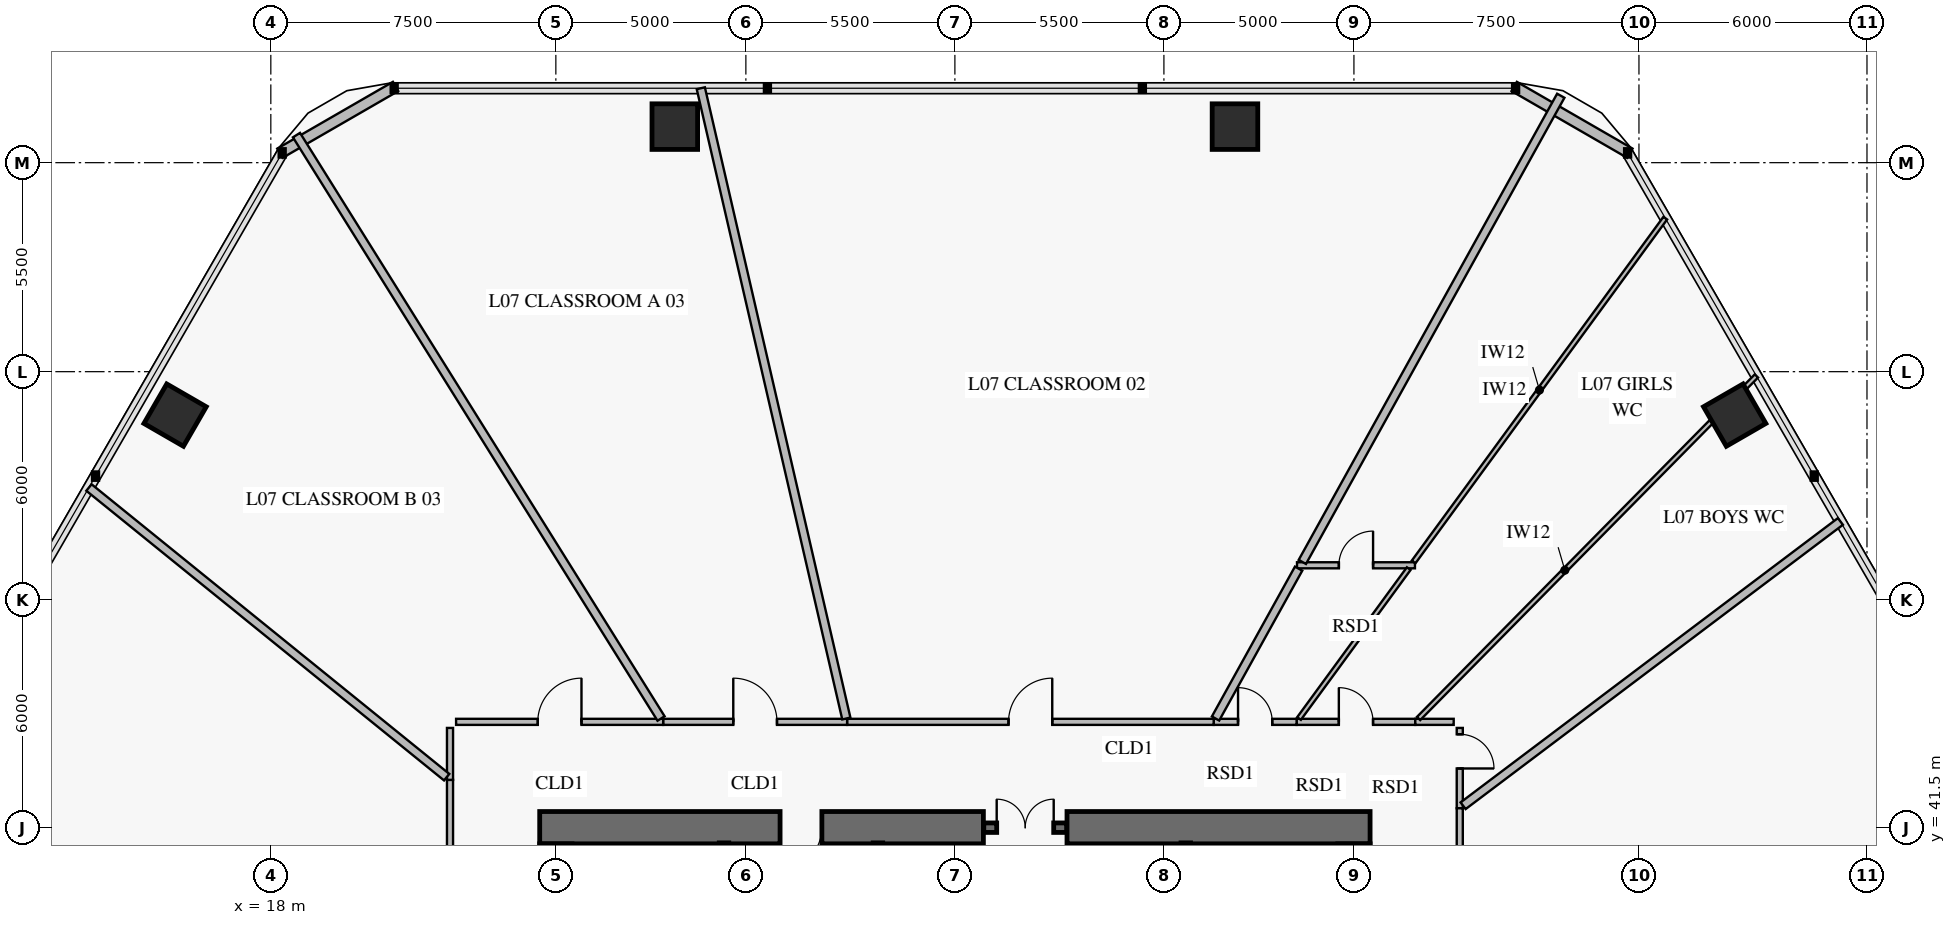
"""IFC4 building model, lengths in metres.
Left out: names, types, materials, properties, quantities, classifications, styles, units other than length and angle.
Written with IfcOpenShell. Run it as: python <this file> out.ifc"""

import sys

from ifc_helpers import new_model, si_unit, direction, frame, frame_2d, origin, origin_2d, place, context, subcontext, project, spatial, rectangle, extrude, element, fill, save


model = new_model("IFC4")
c1 = context("Model", 3, precision=1e-05, world=origin(), true_north=direction((0.0, 1.0)))
c2 = subcontext(c1, "Body", "Model", "MODEL_VIEW")
j1 = project(units=[si_unit("LENGTHUNIT", "METRE"), si_unit("PLANEANGLEUNIT", "RADIAN")], contexts=[c1])
p1 = place(None, origin())
s1 = spatial("IfcSite", under=j1, at=p1, CompositionType="ELEMENT")
p2 = place(p1, origin())
s2 = spatial("IfcBuilding", under=s1, at=p2, CompositionType="ELEMENT")
p3 = place(p2, frame((0.0, 0.0, 28.8)))
s3 = spatial("IfcBuildingStorey", under=s2, at=p3, CompositionType="ELEMENT", Elevation=28.8)
p4 = place(p3, frame((46.925, 41.5, 0.0), z_axis=(0.0, 0.0, 1.0), x_axis=(-1.0, 0.0, 0.0)))
e1 = element("IfcWall", 1, at=p4, inside=s3, PredefinedType="SHEAR", context=c2, shape_type="SweptSolid", body=[
    extrude(rectangle(XDim=7.975, YDim=0.85, at=frame_2d((3.988, 0.0))), origin(), (0.0, 0.0, 1.0), 4.2),
])
p5 = place(p3, frame((36.75, 41.5, 0.0), z_axis=(0.0, 0.0, 1.0), x_axis=(-1.0, 0.0, 0.0)))
e2 = element("IfcWall", 2, at=p5, inside=s3, PredefinedType="SHEAR", context=c2, shape_type="SweptSolid", body=[
    extrude(rectangle(XDim=11.675, YDim=0.85, at=frame_2d((5.837, 0.0))), origin(), (0.0, 0.0, 1.0), 4.2),
])
p6 = place(p5, frame((4.25, 0.0, 0.0)))
e3 = element("IfcOpeningElement", 3, at=p6, cuts=e2, PredefinedType="OPENING", context=c2, shape_type="SweptSolid", body=[
    extrude(rectangle(XDim=1.1, YDim=2.15, at=frame_2d((0.55, 1.075))), frame((0.0, 0.437, 0.0), z_axis=(0.0, -1.0, 0.0), x_axis=(1.0, 0.0, 0.0)), (0.0, 0.0, 1.0), 0.874),
])
p7 = place(p3, frame((25.5, 22.925, 0.0), z_axis=(0.0, 0.0, 1.0), x_axis=(0.0, 1.0, 0.0)))
e4 = element("IfcWall", 4, at=p7, inside=s3, PredefinedType="SHEAR", context=c2, shape_type="SweptSolid", body=[
    extrude(rectangle(XDim=18.15, YDim=0.85, at=frame_2d((9.075, 0.0))), origin(), (0.0, 0.0, 1.0), 4.2),
])
p8 = place(p7, frame((8.825, 0.0, 0.0)))
e5 = element("IfcOpeningElement", 5, at=p8, cuts=e4, PredefinedType="OPENING", context=c2, shape_type="SweptSolid", body=[
    extrude(rectangle(XDim=1.1, YDim=2.15, at=frame_2d((0.55, 1.075))), frame((0.0, 0.437, 0.0), z_axis=(0.0, -1.0, 0.0), x_axis=(1.0, 0.0, 0.0)), (0.0, 0.0, 1.0), 0.874),
])
p9 = place(p3, frame((46.5, 22.925, 0.0), z_axis=(0.0, 0.0, 1.0), x_axis=(0.0, 1.0, 0.0)))
e6 = element("IfcWall", 6, at=p9, inside=s3, PredefinedType="SHEAR", context=c2, shape_type="SweptSolid", body=[
    extrude(rectangle(XDim=18.15, YDim=0.85, at=frame_2d((9.075, 0.0))), origin(), (0.0, 0.0, 1.0), 4.2),
])
p10 = place(p9, frame((8.825, 0.0, 0.0)))
e7 = element("IfcOpeningElement", 7, at=p10, cuts=e6, PredefinedType="OPENING", context=c2, shape_type="SweptSolid", body=[
    extrude(rectangle(XDim=1.1, YDim=2.15, at=frame_2d((0.55, 1.075))), frame((0.0, 0.437, 0.0), z_axis=(0.0, -1.0, 0.0), x_axis=(1.0, 0.0, 0.0)), (0.0, 0.0, 1.0), 0.874),
])
for number, where, z_axis, x_axis in (
    (8, (56.519, 52.357, 0.0), (0.0, 0.0, 1.0), (-0.5, 0.866, 0.0)),
    (9, (43.37, 59.948, 0.0), (0.0, 0.0, 1.0), (-1.0, 0.0, 0.0)),
    (10, (28.63, 59.948, 0.0), (0.0, 0.0, 1.0), (-1.0, 0.0, 0.0)),
    (11, (15.481, 52.357, 0.0), (0.0, 0.0, 1.0), (-0.5, -0.866, 0.0)),
):
    element("IfcColumn", number, at=place(p3, frame(where, z_axis=z_axis, x_axis=x_axis)), inside=s3, PredefinedType="COLUMN", context=c2, shape_type="SweptSolid", body=[
        extrude(rectangle(XDim=1.2, YDim=1.2, at=origin_2d()), origin(), (0.0, 0.0, 1.0), 3.92),
    ])
for number, where, z_axis, x_axis in (
    (12, (18.239, 59.249, 0.0), (0.0, 0.0, 1.0), (0.866, 0.5, 0.0)),
    (13, (50.717, 61.006, 0.0), (0.0, 0.0, 1.0), (0.866, -0.5, 0.0)),
):
    element("IfcWall", number, at=place(p3, frame(where, z_axis=z_axis, x_axis=x_axis)), inside=s3, PredefinedType="SOLIDWALL", context=c2, shape_type="SweptSolid", body=[
        extrude(rectangle(XDim=3.515, YDim=0.28, at=frame_2d((1.757, 0.0))), origin(), (0.0, 0.0, 1.0), 3.92),
    ])
p11 = place(p3, frame((36.76, 41.5, 0.0), z_axis=(0.0, 0.0, 1.0), x_axis=(1.0, 0.0, 0.0)))
e14 = element("IfcWall", 14, at=p11, inside=s3, PredefinedType="SOLIDWALL", context=c2, shape_type="SweptSolid", body=[
    extrude(rectangle(XDim=2.18, YDim=0.25, at=frame_2d((1.09, 0.0))), origin(), (0.0, 0.0, 1.0), 4.2),
])
p12 = place(p11, frame((0.34, 0.0, 0.0)))
e15 = element("IfcOpeningElement", 15, at=p12, cuts=e14, PredefinedType="OPENING", context=c2, shape_type="SweptSolid", body=[
    extrude(rectangle(XDim=1.5, YDim=2.15, at=frame_2d((0.75, 1.075))), frame((0.0, 0.137, 0.0), z_axis=(0.0, -1.0, 0.0), x_axis=(1.0, 0.0, 0.0)), (0.0, 0.0, 1.0), 0.274),
])
for number, where, z_axis, x_axis in (
    (16, (29.925, 31.4, 0.0), (0.0, 0.0, 1.0), (0.0, 1.0, 0.0)),
    (17, (33.975, 31.4, 0.0), (0.0, 0.0, 1.0), (0.0, 1.0, 0.0)),
    (18, (42.075, 31.4, 0.0), (0.0, 0.0, 1.0), (0.0, 1.0, 0.0)),
):
    element("IfcWall", number, at=place(p3, frame(where, z_axis=z_axis, x_axis=x_axis)), inside=s3, PredefinedType="SOLIDWALL", context=c2, shape_type="SweptSolid", body=[
        extrude(rectangle(XDim=9.7, YDim=0.25, at=frame_2d((4.85, 0.0))), origin(), (0.0, 0.0, 1.0), 4.2),
    ])
p13 = place(p3, frame((49.285, 42.011, 0.0), z_axis=(0.0, 0.0, 1.0), x_axis=(0.0, 1.0, 0.0)))
e19 = element("IfcWall", 19, at=p13, inside=s3, PredefinedType="PARTITIONING", context=c2, shape_type="SweptSolid", body=[
    extrude(rectangle(XDim=2.114, YDim=0.16, at=frame_2d((1.057, 0.0))), origin(), (0.0, 0.0, 1.0), 3.92),
])
p14 = place(p13, frame((1.047, 0.0, 0.0)))
e20 = element("IfcOpeningElement", 20, at=p14, cuts=e19, PredefinedType="OPENING", context=c2, shape_type="SweptSolid", body=[
    extrude(rectangle(XDim=0.9, YDim=2.1, at=frame_2d((0.45, 1.05))), frame((0.0, 0.092, 0.0), z_axis=(0.0, -1.0, 0.0), x_axis=(1.0, 0.0, 0.0)), (0.0, 0.0, 1.0), 0.184),
])
p15 = place(p3, frame((48.115, 44.285, 0.0), z_axis=(0.0, 0.0, 1.0), x_axis=(-1.0, 0.0, 0.0)))
e21 = element("IfcWall", 21, at=p15, inside=s3, PredefinedType="PARTITIONING", context=c2, shape_type="SweptSolid", body=[
    extrude(rectangle(XDim=3.124, YDim=0.16, at=frame_2d((1.562, 0.0))), origin(), (0.0, 0.0, 1.0), 3.92),
])
p16 = place(p15, frame((1.112, 0.0, 0.0)))
e22 = element("IfcOpeningElement", 22, at=p16, cuts=e21, PredefinedType="OPENING", context=c2, shape_type="SweptSolid", body=[
    extrude(rectangle(XDim=0.9, YDim=2.1, at=frame_2d((0.45, 1.05))), frame((0.0, 0.092, 0.0), z_axis=(0.0, -1.0, 0.0), x_axis=(1.0, 0.0, 0.0)), (0.0, 0.0, 1.0), 0.184),
])
p17 = place(p3, frame((45.002, 48.405, 0.0), z_axis=(0.0, 0.0, 1.0), x_axis=(1.0, 0.0, 0.0)))
e23 = element("IfcWall", 23, at=p17, inside=s3, PredefinedType="PARTITIONING", context=c2, shape_type="SweptSolid", body=[
    extrude(rectangle(XDim=3.104, YDim=0.16, at=frame_2d((1.552, 0.0))), origin(), (0.0, 0.0, 1.0), 3.92),
])
p18 = place(p17, frame((1.102, 0.0, 0.0)))
e24 = element("IfcOpeningElement", 24, at=p18, cuts=e23, PredefinedType="OPENING", context=c2, shape_type="SweptSolid", body=[
    extrude(rectangle(XDim=0.9, YDim=2.1, at=frame_2d((0.45, 1.05))), frame((0.0, 0.092, 0.0), z_axis=(0.0, -1.0, 0.0), x_axis=(1.0, 0.0, 0.0)), (0.0, 0.0, 1.0), 0.184),
])
p19 = place(p3, frame((44.991, 44.285, 0.0), z_axis=(0.0, 0.0, 1.0), x_axis=(-1.0, 0.0, 0.0)))
e25 = element("IfcWall", 25, at=p19, inside=s3, PredefinedType="PARTITIONING", context=c2, shape_type="SweptSolid", body=[
    extrude(rectangle(XDim=2.181, YDim=0.16, at=frame_2d((1.091, 0.0))), origin(), (0.0, 0.0, 1.0), 3.92),
])
p20 = place(p19, frame((0.641, 0.0, 0.0)))
e26 = element("IfcOpeningElement", 26, at=p20, cuts=e25, PredefinedType="OPENING", context=c2, shape_type="SweptSolid", body=[
    extrude(rectangle(XDim=0.9, YDim=2.1, at=frame_2d((0.45, 1.05))), frame((0.0, 0.092, 0.0), z_axis=(0.0, -1.0, 0.0), x_axis=(1.0, 0.0, 0.0)), (0.0, 0.0, 1.0), 0.184),
])
p21 = place(p3, frame((42.81, 44.285, 0.0), z_axis=(0.0, 0.0, 1.0), x_axis=(-1.0, 0.0, 0.0)))
e27 = element("IfcWall", 27, at=p21, inside=s3, PredefinedType="PARTITIONING", context=c2, shape_type="SweptSolid", body=[
    extrude(rectangle(XDim=9.646, YDim=0.16, at=frame_2d((4.823, 0.0))), origin(), (0.0, 0.0, 1.0), 3.22),
])
p22 = place(p21, frame((4.248, 0.0, 0.0)))
e28 = element("IfcOpeningElement", 28, at=p22, cuts=e27, PredefinedType="OPENING", context=c2, shape_type="SweptSolid", body=[
    extrude(rectangle(XDim=1.15, YDim=2.2, at=frame_2d((0.575, 1.1))), frame((0.0, 0.092, 0.0), z_axis=(0.0, -1.0, 0.0), x_axis=(1.0, 0.0, 0.0)), (0.0, 0.0, 1.0), 0.184),
])
p23 = place(p3, frame((33.164, 44.285, 0.0), z_axis=(0.0, 0.0, 1.0), x_axis=(-1.0, 0.0, 0.0)))
e29 = element("IfcWall", 29, at=p23, inside=s3, PredefinedType="PARTITIONING", context=c2, shape_type="SweptSolid", body=[
    extrude(rectangle(XDim=4.84, YDim=0.16, at=frame_2d((2.42, 0.0))), origin(), (0.0, 0.0, 1.0), 3.22),
])
p24 = place(p23, frame((1.845, 0.0, 0.0)))
e30 = element("IfcOpeningElement", 30, at=p24, cuts=e29, PredefinedType="OPENING", context=c2, shape_type="SweptSolid", body=[
    extrude(rectangle(XDim=1.15, YDim=2.2, at=frame_2d((0.575, 1.1))), frame((0.0, 0.092, 0.0), z_axis=(0.0, -1.0, 0.0), x_axis=(1.0, 0.0, 0.0)), (0.0, 0.0, 1.0), 0.184),
])
p25 = place(p3, frame((28.323, 44.285, 0.0), z_axis=(0.0, 0.0, 1.0), x_axis=(-1.0, 0.0, 0.0)))
e31 = element("IfcWall", 31, at=p25, inside=s3, PredefinedType="PARTITIONING", context=c2, shape_type="SweptSolid", body=[
    extrude(rectangle(XDim=5.448, YDim=0.16, at=frame_2d((2.724, 0.0))), origin(), (0.0, 0.0, 1.0), 3.22),
])
p26 = place(p25, frame((2.149, 0.0, 0.0)))
e32 = element("IfcOpeningElement", 32, at=p26, cuts=e31, PredefinedType="OPENING", context=c2, shape_type="SweptSolid", body=[
    extrude(rectangle(XDim=1.15, YDim=2.2, at=frame_2d((0.575, 1.1))), frame((0.0, 0.092, 0.0), z_axis=(0.0, -1.0, 0.0), x_axis=(1.0, 0.0, 0.0)), (0.0, 0.0, 1.0), 0.184),
])
p27 = place(p3, frame((22.715, 42.758, 0.0), z_axis=(0.0, 0.0, 1.0), x_axis=(0.0, -1.0, 0.0)))
e33 = element("IfcWall", 33, at=p27, inside=s3, PredefinedType="PARTITIONING", context=c2, shape_type="SweptSolid", body=[
    extrude(rectangle(XDim=11.454, YDim=0.16, at=frame_2d((5.727, 0.0))), origin(), (0.0, 0.0, 1.0), 3.22),
])
p28 = place(p27, frame((5.152, 0.0, 0.0)))
e34 = element("IfcOpeningElement", 34, at=p28, cuts=e33, PredefinedType="OPENING", context=c2, shape_type="SweptSolid", body=[
    extrude(rectangle(XDim=1.15, YDim=2.2, at=frame_2d((0.575, 1.1))), frame((0.0, 0.092, 0.0), z_axis=(0.0, -1.0, 0.0), x_axis=(1.0, 0.0, 0.0)), (0.0, 0.0, 1.0), 0.184),
])
p29 = place(p3, frame((49.285, 29.896, 0.0), z_axis=(0.0, 0.0, 1.0), x_axis=(0.0, 1.0, 0.0)))
e35 = element("IfcWall", 35, at=p29, inside=s3, PredefinedType="PARTITIONING", context=c2, shape_type="SweptSolid", body=[
    extrude(rectangle(XDim=12.115, YDim=0.16, at=frame_2d((6.058, 0.0))), origin(), (0.0, 0.0, 1.0), 3.22),
])
p30 = place(p29, frame((5.583, 0.0, 0.0)))
e36 = element("IfcOpeningElement", 36, at=p30, cuts=e35, PredefinedType="OPENING", context=c2, shape_type="SweptSolid", body=[
    extrude(rectangle(XDim=0.95, YDim=2.1, at=frame_2d((0.475, 1.05))), frame((0.0, 0.092, 0.0), z_axis=(0.0, -1.0, 0.0), x_axis=(1.0, 0.0, 0.0)), (0.0, 0.0, 1.0), 0.184),
])
p31 = place(p3, frame((49.373, 42.077, 0.0), z_axis=(0.0, 0.0, 1.0), x_axis=(0.798630996951, 0.601821012187, 0.0)))
e37 = element("IfcWall", 37, at=p31, inside=s3, PredefinedType="PARTITIONING", context=c2, shape_type="SweptSolid", body=[
    extrude(rectangle(XDim=12.431, YDim=0.22, at=frame_2d((6.215, 0.0))), origin(), (0.0, 0.0, 1.0), 3.17),
])
p32 = place(p3, frame((49.125, 44.285, 0.0), z_axis=(0.0, 0.0, 1.0), x_axis=(-1.0, 0.0, 0.0)))
e38 = element("IfcWall", 38, at=p32, inside=s3, PredefinedType="PARTITIONING", context=c2, shape_type="SweptSolid", body=[
    extrude(rectangle(XDim=1.01, YDim=0.16, at=frame_2d((0.505, 0.0))), origin(), (0.0, 0.0, 1.0), 3.22),
])
p33 = place(p3, frame((48.201, 44.373, 0.0), z_axis=(0.0, 0.0, 1.0), x_axis=(0.702156728527, 0.712022421405, 0.0)))
e39 = element("IfcWall", 39, at=p33, inside=s3, PredefinedType="PARTITIONING", context=c2, shape_type="SweptSolid", body=[
    extrude(rectangle(XDim=10.963, YDim=0.12, at=frame_2d((5.481, 0.0))), origin(), (0.0, 0.0, 1.0), 3.22),
])
p34 = place(p3, frame((56.686, 52.977, 0.0), z_axis=(0.0, 0.0, 1.0), x_axis=(0.702004585151, 0.712172424646, 0.0)))
e40 = element("IfcWall", 40, at=p34, inside=s3, PredefinedType="PARTITIONING", context=c2, shape_type="SweptSolid", body=[
    extrude(rectangle(XDim=0.576, YDim=0.12, at=frame_2d((0.288, 0.0))), origin(), (0.0, 0.0, 1.0), 3.92),
])
p35 = place(p3, frame((45.056, 44.373, 0.0), z_axis=(0.0, 0.0, 1.0), x_axis=(0.590607595118, 0.806958901425, 0.0)))
e41 = element("IfcWall", 41, at=p35, inside=s3, PredefinedType="PARTITIONING", context=c2, shape_type="SweptSolid", body=[
    extrude(rectangle(XDim=4.887, YDim=0.12, at=frame_2d((2.444, 0.0))), origin(), (0.0, 0.0, 1.0), 3.92),
])
p36 = place(p3, frame((48.071, 48.493, 0.0), z_axis=(0.0, 0.0, 1.0), x_axis=(0.590600620108, 0.80696400634, 0.0)))
e42 = element("IfcWall", 42, at=p36, inside=s3, PredefinedType="PARTITIONING", context=c2, shape_type="SweptSolid", body=[
    extrude(rectangle(XDim=11.212, YDim=0.12, at=frame_2d((5.606, 0.0))), origin(), (0.0, 0.0, 1.0), 3.17),
])
p37 = place(p3, frame((42.858, 44.373, 0.0), z_axis=(0.0, 0.0, 1.0), x_axis=(0.484838262691, 0.87460382976, 0.0)))
e43 = element("IfcWall", 43, at=p37, inside=s3, PredefinedType="PARTITIONING", context=c2, shape_type="SweptSolid", body=[
    extrude(rectangle(XDim=4.509, YDim=0.22, at=frame_2d((2.255, 0.0))), origin(), (0.0, 0.0, 1.0), 3.92),
])
p38 = place(p3, frame((45.142, 48.493, 0.0), z_axis=(0.0, 0.0, 1.0), x_axis=(0.484815156974, 0.874616638058, 0.0)))
e44 = element("IfcWall", 44, at=p38, inside=s3, PredefinedType="PARTITIONING", context=c2, shape_type="SweptSolid", body=[
    extrude(rectangle(XDim=14.027, YDim=0.22, at=frame_2d((7.014, 0.0))), origin(), (0.0, 0.0, 1.0), 3.17),
])
p39 = place(p3, frame((33.144, 44.373, 0.0), z_axis=(0.0, 0.0, 1.0), x_axis=(-0.224953781902, 0.974369435075, 0.0)))
e45 = element("IfcWall", 45, at=p39, inside=s3, PredefinedType="PARTITIONING", context=c2, shape_type="SweptSolid", body=[
    extrude(rectangle(XDim=17.022, YDim=0.22, at=frame_2d((8.511, 0.0))), origin(), (0.0, 0.0, 1.0), 3.17),
])
p40 = place(p3, frame((28.269, 44.373, 0.0), z_axis=(0.0, 0.0, 1.0), x_axis=(-0.529928627855, 0.848042245044, 0.0)))
e46 = element("IfcWall", 46, at=p40, inside=s3, PredefinedType="PARTITIONING", context=c2, shape_type="SweptSolid", body=[
    extrude(rectangle(XDim=18.103, YDim=0.22, at=frame_2d((9.052, 0.0))), origin(), (0.0, 0.0, 1.0), 3.17),
])
p41 = place(p3, frame((22.715, 44.125, 0.0), z_axis=(0.0, 0.0, 1.0), x_axis=(0.0, -1.0, 0.0)))
e47 = element("IfcWall", 47, at=p41, inside=s3, PredefinedType="PARTITIONING", context=c2, shape_type="SweptSolid", body=[
    extrude(rectangle(XDim=1.367, YDim=0.16, at=frame_2d((0.684, 0.0))), origin(), (0.0, 0.0, 1.0), 3.92),
])
p42 = place(p3, frame((22.627, 42.829, 0.0), z_axis=(0.0, 0.0, 1.0), x_axis=(-0.777142055765, 0.629325214147, 0.0)))
e48 = element("IfcWall", 48, at=p42, inside=s3, PredefinedType="PARTITIONING", context=c2, shape_type="SweptSolid", body=[
    extrude(rectangle(XDim=12.112, YDim=0.22, at=frame_2d((6.056, 0.0))), origin(), (0.0, 0.0, 1.0), 3.17),
])
p43 = place(p6, origin())
e49 = element("IfcDoor", 49, at=p43, inside=s3, OperationType="SINGLE_SWING_RIGHT", PredefinedType="USERDEFINED", context=c2, shape_type="SweptSolid", body=[
    extrude(rectangle(XDim=1.1, YDim=2.15, at=frame_2d((0.55, 1.075))), frame((0.0, 0.025, 0.0), z_axis=(0.0, -1.0, 0.0), x_axis=(1.0, 0.0, 0.0)), (0.0, 0.0, 1.0), 0.05),
])
fill(e3, e49)
p44 = place(p12, origin())
e50 = element("IfcDoor", 50, at=p44, inside=s3, OperationType="DOUBLE_DOOR_SINGLE_SWING", PredefinedType="DOOR", context=c2, shape_type="SweptSolid", body=[
    extrude(rectangle(XDim=1.5, YDim=2.15, at=frame_2d((0.75, 1.075))), frame((0.0, 0.025, 0.0), z_axis=(0.0, -1.0, 0.0), x_axis=(1.0, 0.0, 0.0)), (0.0, 0.0, 1.0), 0.05),
])
fill(e15, e50)
p45 = place(p14, frame((0.9, 0.0, 0.0), z_axis=(0.0, 0.0, 1.0), x_axis=(-1.0, 0.0, 0.0)))
e51 = element("IfcDoor", 51, at=p45, inside=s3, OperationType="SINGLE_SWING_RIGHT", PredefinedType="DOOR", context=c2, shape_type="SweptSolid", body=[
    extrude(rectangle(XDim=0.9, YDim=2.1, at=frame_2d((0.45, 1.05))), frame((0.0, 0.025, 0.0), z_axis=(0.0, -1.0, 0.0), x_axis=(1.0, 0.0, 0.0)), (0.0, 0.0, 1.0), 0.05),
])
fill(e20, e51)
p46 = place(p16, frame((0.9, 0.0, 0.0), z_axis=(0.0, 0.0, 1.0), x_axis=(-1.0, 0.0, 0.0)))
e52 = element("IfcDoor", 52, at=p46, inside=s3, OperationType="SINGLE_SWING_LEFT", PredefinedType="DOOR", context=c2, shape_type="SweptSolid", body=[
    extrude(rectangle(XDim=0.9, YDim=2.1, at=frame_2d((0.45, 1.05))), frame((0.0, 0.025, 0.0), z_axis=(0.0, -1.0, 0.0), x_axis=(1.0, 0.0, 0.0)), (0.0, 0.0, 1.0), 0.05),
])
fill(e22, e52)
p47 = place(p18, origin())
e53 = element("IfcDoor", 53, at=p47, inside=s3, OperationType="SINGLE_SWING_RIGHT", PredefinedType="DOOR", context=c2, shape_type="SweptSolid", body=[
    extrude(rectangle(XDim=0.9, YDim=2.1, at=frame_2d((0.45, 1.05))), frame((0.0, 0.025, 0.0), z_axis=(0.0, -1.0, 0.0), x_axis=(1.0, 0.0, 0.0)), (0.0, 0.0, 1.0), 0.05),
])
fill(e24, e53)
p48 = place(p20, frame((0.9, 0.0, 0.0), z_axis=(0.0, 0.0, 1.0), x_axis=(-1.0, 0.0, 0.0)))
e54 = element("IfcDoor", 54, at=p48, inside=s3, OperationType="SINGLE_SWING_LEFT", PredefinedType="DOOR", context=c2, shape_type="SweptSolid", body=[
    extrude(rectangle(XDim=0.9, YDim=2.1, at=frame_2d((0.45, 1.05))), frame((0.0, 0.025, 0.0), z_axis=(0.0, -1.0, 0.0), x_axis=(1.0, 0.0, 0.0)), (0.0, 0.0, 1.0), 0.05),
])
fill(e26, e54)
p49 = place(p22, frame((1.15, 0.0, 0.0), z_axis=(0.0, 0.0, 1.0), x_axis=(-1.0, 0.0, 0.0)))
e55 = element("IfcDoor", 55, at=p49, inside=s3, OperationType="SINGLE_SWING_RIGHT", PredefinedType="DOOR", context=c2, shape_type="SweptSolid", body=[
    extrude(rectangle(XDim=1.15, YDim=2.2, at=frame_2d((0.575, 1.1))), frame((0.0, 0.025, 0.0), z_axis=(0.0, -1.0, 0.0), x_axis=(1.0, 0.0, 0.0)), (0.0, 0.0, 1.0), 0.05),
])
fill(e28, e55)
p50 = place(p24, frame((1.15, 0.0, 0.0), z_axis=(0.0, 0.0, 1.0), x_axis=(-1.0, 0.0, 0.0)))
e56 = element("IfcDoor", 56, at=p50, inside=s3, OperationType="SINGLE_SWING_LEFT", PredefinedType="DOOR", context=c2, shape_type="SweptSolid", body=[
    extrude(rectangle(XDim=1.15, YDim=2.2, at=frame_2d((0.575, 1.1))), frame((0.0, 0.025, 0.0), z_axis=(0.0, -1.0, 0.0), x_axis=(1.0, 0.0, 0.0)), (0.0, 0.0, 1.0), 0.05),
])
fill(e30, e56)
p51 = place(p26, frame((1.15, 0.0, 0.0), z_axis=(0.0, 0.0, 1.0), x_axis=(-1.0, 0.0, 0.0)))
e57 = element("IfcDoor", 57, at=p51, inside=s3, OperationType="SINGLE_SWING_RIGHT", PredefinedType="DOOR", context=c2, shape_type="SweptSolid", body=[
    extrude(rectangle(XDim=1.15, YDim=2.2, at=frame_2d((0.575, 1.1))), frame((0.0, 0.025, 0.0), z_axis=(0.0, -1.0, 0.0), x_axis=(1.0, 0.0, 0.0)), (0.0, 0.0, 1.0), 0.05),
])
fill(e32, e57)
save(model, sys.argv[1])
